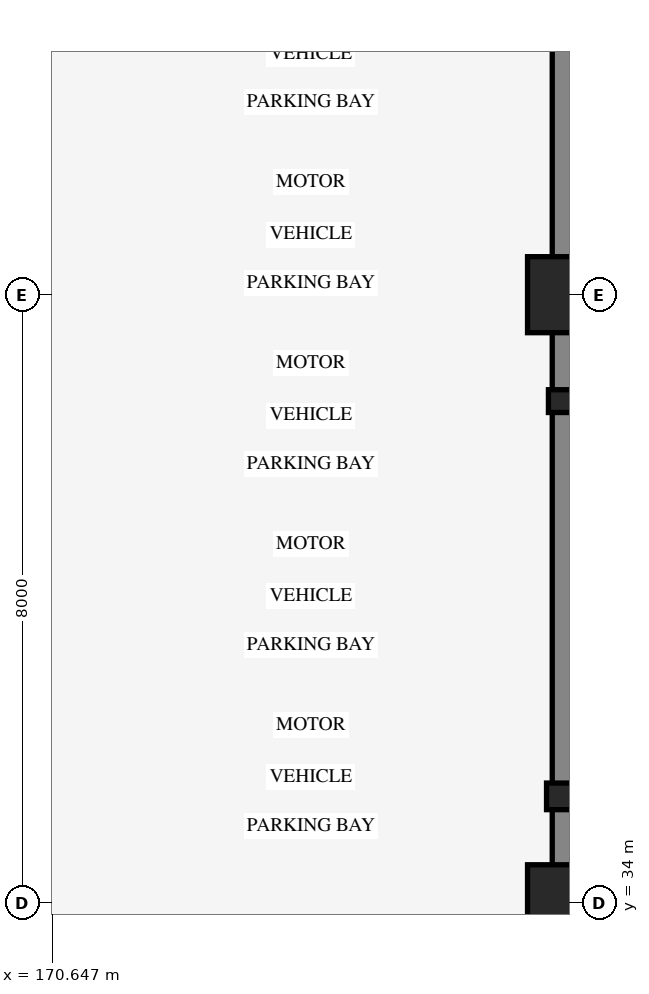
"""IFC4 building model, lengths in metres.
Left out: names, types, materials, properties, quantities, classifications, styles, units other than length and angle.
Written with IfcOpenShell. Run it as: python <this file> out.ifc"""

import sys

from ifc_helpers import new_model, si_unit, direction, frame, frame_2d, origin, origin_2d, place, context, subcontext, project, spatial, rectangle, extrude, element, save


model = new_model("IFC4")
c1 = context("Model", 3, precision=1e-05, world=origin(), true_north=direction((0.0, 1.0)))
c2 = subcontext(c1, "Body", "Model", "MODEL_VIEW")
j1 = project(units=[si_unit("LENGTHUNIT", "METRE"), si_unit("PLANEANGLEUNIT", "RADIAN")], contexts=[c1])
p1 = place(None, origin())
s1 = spatial("IfcSite", under=j1, at=p1, CompositionType="ELEMENT")
p2 = place(p1, origin())
s2 = spatial("IfcBuilding", under=s1, at=p2, CompositionType="ELEMENT")
p3 = place(p2, frame((0.0, 0.0, -4.5)))
s3 = spatial("IfcBuildingStorey", under=s2, at=p3, CompositionType="ELEMENT", Elevation=-4.5)
p4 = place(p3, frame((177.4, 26.0, 0.0), z_axis=(0.0, 0.0, 1.0), x_axis=(0.0, 1.0, 0.0)))
e1 = element("IfcWall", 1, at=p4, inside=s3, PredefinedType="SOLIDWALL", context=c2, shape_type="SweptSolid", body=[
    extrude(rectangle(XDim=80.0, YDim=0.35, at=frame_2d((40.0, 0.0))), origin(), (0.0, 0.0, 1.0), 4.22),
])
for number, where, z_axis, x_axis in (
    (2, (177.4, 34.0, 0.0), (0.0, 0.0, 1.0), (1.0, 0.0, 0.0)),
    (3, (177.4, 42.0, 0.0), (0.0, 0.0, 1.0), (1.0, 0.0, 0.0)),
):
    element("IfcColumn", number, at=place(p3, frame(where, z_axis=z_axis, x_axis=x_axis)), inside=s3, PredefinedType="COLUMN", context=c2, shape_type="SweptSolid", body=[
        extrude(rectangle(XDim=1.0, YDim=1.0, at=origin_2d()), origin(), (0.0, 0.0, 1.0), 4.5),
    ])
p5 = place(p3, frame((177.4, 35.4, 0.0), z_axis=(0.0, 0.0, 1.0), x_axis=(0.0, 1.0, 0.0)))
e4 = element("IfcColumn", 4, at=p5, inside=s3, PredefinedType="PILASTER", context=c2, shape_type="SweptSolid", body=[
    extrude(rectangle(XDim=0.35, YDim=0.5, at=origin_2d()), origin(), (0.0, 0.0, 1.0), 4.5),
])
p6 = place(p3, frame((177.4, 40.6, 0.0), z_axis=(0.0, 0.0, 1.0), x_axis=(0.0, 1.0, 0.0)))
e5 = element("IfcColumn", 5, at=p6, inside=s3, PredefinedType="PILASTER", context=c2, shape_type="SweptSolid", body=[
    extrude(rectangle(XDim=0.3, YDim=0.45, at=origin_2d()), origin(), (0.0, 0.0, 1.0), 4.5),
])
save(model, sys.argv[1])
